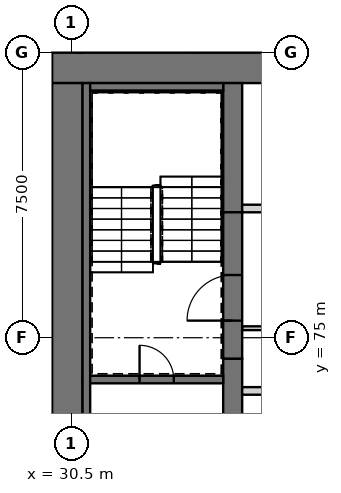
"""IFC4 building model, lengths in metres.
Left out: names, types, materials, properties, quantities, classifications, styles, units other than length and angle.
Written with IfcOpenShell. Run it as: python <this file> out.ifc"""

import sys

from ifc_helpers import new_model, si_unit, direction, frame, frame_2d, origin, place, context, subcontext, project, spatial, rectangle, extrude, element, fill, save


model = new_model("IFC4")
c1 = context("Model", 3, precision=1e-05, world=origin(), true_north=direction((0.0, 1.0)))
c2 = subcontext(c1, "Body", "Model", "MODEL_VIEW")
j1 = project(units=[si_unit("LENGTHUNIT", "METRE"), si_unit("PLANEANGLEUNIT", "RADIAN")], contexts=[c1])
p1 = place(None, origin())
s1 = spatial("IfcSite", under=j1, at=p1, CompositionType="ELEMENT")
p2 = place(p1, origin())
s2 = spatial("IfcBuilding", under=s1, at=p2, CompositionType="ELEMENT")
p3 = place(p2, frame((0.0, 0.0, 174.2)))
s3 = spatial("IfcBuildingStorey", under=s2, at=p3, CompositionType="ELEMENT", Elevation=174.2)
p4 = place(p3, frame((30.0, 82.1, 0.0), z_axis=(0.0, 0.0, 1.0), x_axis=(1.0, 0.0, 0.0)))
e1 = element("IfcWall", 1, at=p4, inside=s3, PredefinedType="SHEAR", context=c2, shape_type="SweptSolid", body=[
    extrude(rectangle(XDim=30.0, YDim=0.8, at=frame_2d((15.0, 0.0))), origin(), (0.0, 0.0, 1.0), 5.0),
])
p5 = place(p3, frame((30.4, 60.8, 0.0), z_axis=(0.0, 0.0, 1.0), x_axis=(0.0, 1.0, 0.0)))
e2 = element("IfcWall", 2, at=p5, inside=s3, PredefinedType="SHEAR", context=c2, shape_type="SweptSolid", body=[
    extrude(rectangle(XDim=20.9, YDim=0.8, at=frame_2d((10.45, 0.0))), origin(), (0.0, 0.0, 1.0), 5.0),
])
p6 = place(p3, frame((34.75, 68.05, 0.0), z_axis=(0.0, 0.0, 1.0), x_axis=(0.0, 1.0, 0.0)))
e3 = element("IfcWall", 3, at=p6, inside=s3, PredefinedType="SHEAR", context=c2, shape_type="SweptSolid", body=[
    extrude(rectangle(XDim=6.4, YDim=0.5, at=frame_2d((3.2, 0.0))), origin(), (0.0, 0.0, 1.0), 5.0),
])
p7 = place(p3, frame((34.75, 78.3, 0.0), z_axis=(0.0, 0.0, 1.0), x_axis=(0.0, 1.0, 0.0)))
e4 = element("IfcWall", 4, at=p7, inside=s3, PredefinedType="SHEAR", context=c2, shape_type="SweptSolid", body=[
    extrude(rectangle(XDim=3.4, YDim=0.5, at=frame_2d((1.7, 0.0))), origin(), (0.0, 0.0, 1.0), 5.0),
])
p8 = place(p3, frame((35.0, 73.6, 0.0), z_axis=(0.0, 0.0, 1.0), x_axis=(1.0, 0.0, 0.0)))
e5 = element("IfcWall", 5, at=p8, inside=s3, PredefinedType="SOLIDWALL", context=c2, shape_type="SweptSolid", body=[
    extrude(rectangle(XDim=15.6, YDim=0.2, at=frame_2d((7.8, 0.0))), origin(), (0.0, 0.0, 1.0), 5.0),
])
p9 = place(p8, frame((0.75, 0.0, 0.0)))
e6 = element("IfcOpeningElement", 6, at=p9, cuts=e5, PredefinedType="OPENING", context=c2, shape_type="SweptSolid", body=[
    extrude(rectangle(XDim=1.1, YDim=2.1, at=frame_2d((0.55, 1.05))), frame((0.0, 0.11, 0.0), z_axis=(0.0, -1.0, 0.0), x_axis=(1.0, 0.0, 0.0)), (0.0, 0.0, 1.0), 0.22),
])
p10 = place(p8, frame((3.35, 0.0, 0.0)))
e7 = element("IfcOpeningElement", 7, at=p10, cuts=e5, PredefinedType="OPENING", context=c2, shape_type="SweptSolid", body=[
    extrude(rectangle(XDim=1.1, YDim=2.1, at=frame_2d((0.55, 1.05))), frame((0.0, 0.11, 0.0), z_axis=(0.0, -1.0, 0.0), x_axis=(1.0, 0.0, 0.0)), (0.0, 0.0, 1.0), 0.22),
])
p11 = place(p8, frame((5.95, 0.0, 0.0)))
e8 = element("IfcOpeningElement", 8, at=p11, cuts=e5, PredefinedType="OPENING", context=c2, shape_type="SweptSolid", body=[
    extrude(rectangle(XDim=1.1, YDim=2.1, at=frame_2d((0.55, 1.05))), frame((0.0, 0.11, 0.0), z_axis=(0.0, -1.0, 0.0), x_axis=(1.0, 0.0, 0.0)), (0.0, 0.0, 1.0), 0.22),
])
p12 = place(p8, frame((8.55, 0.0, 0.0)))
e9 = element("IfcOpeningElement", 9, at=p12, cuts=e5, PredefinedType="OPENING", context=c2, shape_type="SweptSolid", body=[
    extrude(rectangle(XDim=1.1, YDim=2.1, at=frame_2d((0.55, 1.05))), frame((0.0, 0.11, 0.0), z_axis=(0.0, -1.0, 0.0), x_axis=(1.0, 0.0, 0.0)), (0.0, 0.0, 1.0), 0.22),
])
p13 = place(p8, frame((11.15, 0.0, 0.0)))
e10 = element("IfcOpeningElement", 10, at=p13, cuts=e5, PredefinedType="OPENING", context=c2, shape_type="SweptSolid", body=[
    extrude(rectangle(XDim=1.1, YDim=2.1, at=frame_2d((0.55, 1.05))), frame((0.0, 0.11, 0.0), z_axis=(0.0, -1.0, 0.0), x_axis=(1.0, 0.0, 0.0)), (0.0, 0.0, 1.0), 0.22),
])
p14 = place(p8, frame((13.75, 0.0, 0.0)))
e11 = element("IfcOpeningElement", 11, at=p14, cuts=e5, PredefinedType="OPENING", context=c2, shape_type="SweptSolid", body=[
    extrude(rectangle(XDim=1.1, YDim=2.1, at=frame_2d((0.55, 1.05))), frame((0.0, 0.11, 0.0), z_axis=(0.0, -1.0, 0.0), x_axis=(1.0, 0.0, 0.0)), (0.0, 0.0, 1.0), 0.22),
])
p15 = place(p3, frame((35.0, 78.4, 0.0), z_axis=(0.0, 0.0, 1.0), x_axis=(1.0, 0.0, 0.0)))
e12 = element("IfcWall", 12, at=p15, inside=s3, PredefinedType="SOLIDWALL", context=c2, shape_type="SweptSolid", body=[
    extrude(rectangle(XDim=15.6, YDim=0.2, at=frame_2d((7.8, 0.0))), origin(), (0.0, 0.0, 1.0), 5.0),
])
p16 = place(p15, frame((0.75, 0.0, 0.0)))
e13 = element("IfcOpeningElement", 13, at=p16, cuts=e12, PredefinedType="OPENING", context=c2, shape_type="SweptSolid", body=[
    extrude(rectangle(XDim=1.1, YDim=2.1, at=frame_2d((0.55, 1.05))), frame((0.0, 0.11, 0.0), z_axis=(0.0, -1.0, 0.0), x_axis=(1.0, 0.0, 0.0)), (0.0, 0.0, 1.0), 0.22),
])
p17 = place(p15, frame((3.35, 0.0, 0.0)))
e14 = element("IfcOpeningElement", 14, at=p17, cuts=e12, PredefinedType="OPENING", context=c2, shape_type="SweptSolid", body=[
    extrude(rectangle(XDim=1.1, YDim=2.1, at=frame_2d((0.55, 1.05))), frame((0.0, 0.11, 0.0), z_axis=(0.0, -1.0, 0.0), x_axis=(1.0, 0.0, 0.0)), (0.0, 0.0, 1.0), 0.22),
])
p18 = place(p15, frame((11.15, 0.0, 0.0)))
e15 = element("IfcOpeningElement", 15, at=p18, cuts=e12, PredefinedType="OPENING", context=c2, shape_type="SweptSolid", body=[
    extrude(rectangle(XDim=1.1, YDim=2.1, at=frame_2d((0.55, 1.05))), frame((0.0, 0.11, 0.0), z_axis=(0.0, -1.0, 0.0), x_axis=(1.0, 0.0, 0.0)), (0.0, 0.0, 1.0), 0.22),
])
p19 = place(p15, frame((13.75, 0.0, 0.0)))
e16 = element("IfcOpeningElement", 16, at=p19, cuts=e12, PredefinedType="OPENING", context=c2, shape_type="SweptSolid", body=[
    extrude(rectangle(XDim=1.1, YDim=2.1, at=frame_2d((0.55, 1.05))), frame((0.0, 0.11, 0.0), z_axis=(0.0, -1.0, 0.0), x_axis=(1.0, 0.0, 0.0)), (0.0, 0.0, 1.0), 0.22),
])
p20 = place(p3, frame((35.0, 75.25, 0.0), z_axis=(0.0, 0.0, 1.0), x_axis=(1.0, 0.0, 0.0)))
e17 = element("IfcWall", 17, at=p20, inside=s3, PredefinedType="PARTITIONING", context=c2, shape_type="SweptSolid", body=[
    extrude(rectangle(XDim=5.25, YDim=0.1, at=frame_2d((2.625, 0.0))), origin(), (0.0, 0.0, 1.0), 4.75),
])
p21 = place(p3, frame((34.75, 74.45, 0.0), z_axis=(0.0, 0.0, 1.0), x_axis=(0.0, 1.0, 0.0)))
e18 = element("IfcWall", 18, at=p21, inside=s3, PredefinedType="SOLIDWALL", context=c2, shape_type="SweptSolid", body=[
    extrude(rectangle(XDim=3.85, YDim=0.5, at=frame_2d((1.925, 0.0))), origin(), (0.0, 0.0, 1.0), 3.8),
])
p22 = place(p21, frame((1.0, 0.0, 0.0)))
e19 = element("IfcOpeningElement", 19, at=p22, cuts=e18, PredefinedType="OPENING", context=c2, shape_type="SweptSolid", body=[
    extrude(rectangle(XDim=1.2, YDim=2.1, at=frame_2d((0.6, 1.05))), frame((0.0, 0.26, 0.0), z_axis=(0.0, -1.0, 0.0), x_axis=(1.0, 0.0, 0.0)), (0.0, 0.0, 1.0), 0.52),
])
p23 = place(p3, frame((30.8, 73.9, 0.0), z_axis=(0.0, 0.0, 1.0), x_axis=(1.0, 0.0, 0.0)))
e20 = element("IfcWall", 20, at=p23, inside=s3, PredefinedType="SOLIDWALL", context=c2, shape_type="SweptSolid", body=[
    extrude(rectangle(XDim=3.7, YDim=0.2, at=frame_2d((1.85, 0.0))), origin(), (0.0, 0.0, 1.0), 4.75),
])
p24 = place(p23, frame((1.5, 0.0, 0.0)))
e21 = element("IfcOpeningElement", 21, at=p24, cuts=e20, PredefinedType="OPENING", context=c2, shape_type="SweptSolid", body=[
    extrude(rectangle(XDim=0.9, YDim=2.1, at=frame_2d((0.45, 1.05))), frame((0.0, 0.11, 0.0), z_axis=(0.0, -1.0, 0.0), x_axis=(1.0, 0.0, 0.0)), (0.0, 0.0, 1.0), 0.22),
])
p25 = place(p3, frame((30.9, 60.8, 0.0), z_axis=(0.0, 0.0, 1.0), x_axis=(0.0, 1.0, 0.0)))
e22 = element("IfcWall", 22, at=p25, inside=s3, PredefinedType="SOLIDWALL", context=c2, shape_type="SweptSolid", body=[
    extrude(rectangle(XDim=20.9, YDim=0.2, at=frame_2d((10.45, 0.0))), origin(), (0.0, 0.0, 1.0), 4.75),
])
p26 = place(p3, frame((31.0, 81.6, 0.0), z_axis=(0.0, 0.0, 1.0), x_axis=(1.0, 0.0, 0.0)))
e23 = element("IfcWall", 23, at=p26, inside=s3, PredefinedType="SOLIDWALL", context=c2, shape_type="SweptSolid", body=[
    extrude(rectangle(XDim=3.5, YDim=0.2, at=frame_2d((1.75, 0.0))), origin(), (0.0, 0.0, 1.0), 4.75),
])
p27 = place(p22, origin())
e24 = element("IfcDoor", 24, at=p27, inside=s3, OperationType="SINGLE_SWING_RIGHT", PredefinedType="DOOR", context=c2, shape_type="SweptSolid", body=[
    extrude(rectangle(XDim=1.2, YDim=2.1, at=frame_2d((0.6, 1.05))), frame((0.0, 0.025, 0.0), z_axis=(0.0, -1.0, 0.0), x_axis=(1.0, 0.0, 0.0)), (0.0, 0.0, 1.0), 0.05),
])
fill(e19, e24)
p28 = place(p24, origin())
e25 = element("IfcDoor", 25, at=p28, inside=s3, OperationType="SINGLE_SWING_RIGHT", PredefinedType="DOOR", context=c2, shape_type="SweptSolid", body=[
    extrude(rectangle(XDim=0.9, YDim=2.1, at=frame_2d((0.45, 1.05))), frame((0.0, 0.025, 0.0), z_axis=(0.0, -1.0, 0.0), x_axis=(1.0, 0.0, 0.0)), (0.0, 0.0, 1.0), 0.05),
])
fill(e21, e25)
save(model, sys.argv[1])
